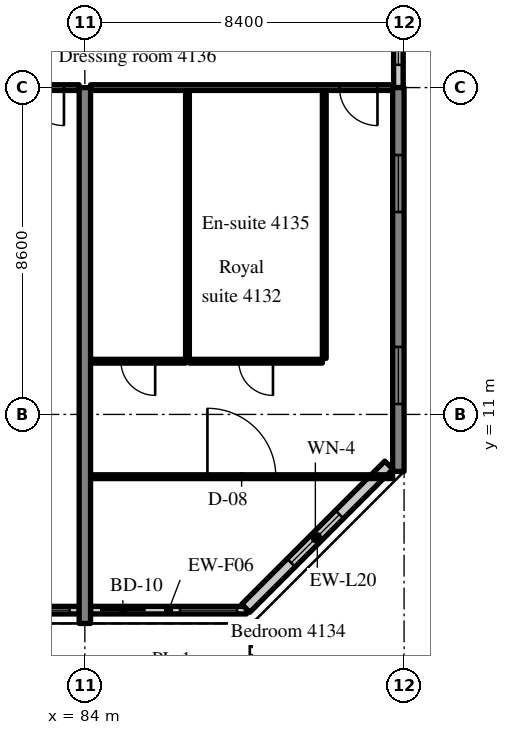
"""IFC4 building model, lengths in metres.
Left out: names, types, materials, properties, quantities, classifications, styles, units other than length and angle.
Written with IfcOpenShell. Run it as: python <this file> out.ifc"""

import sys

from ifc_helpers import new_model, si_unit, direction, frame, frame_2d, origin, place, context, subcontext, project, spatial, rectangle, extrude, source, transform, mapped, element, fill, save


model = new_model("IFC4")
c1 = context("Model", 3, precision=1e-05, world=origin(), true_north=direction((0.0, 1.0)))
c2 = subcontext(c1, "Body", "Model", "MODEL_VIEW")
j1 = project(units=[si_unit("LENGTHUNIT", "METRE"), si_unit("PLANEANGLEUNIT", "RADIAN")], contexts=[c1])
p1 = place(None, origin())
s1 = spatial("IfcSite", under=j1, at=p1, CompositionType="ELEMENT")
p2 = place(p1, origin())
s2 = spatial("IfcBuilding", under=s1, at=p2, CompositionType="ELEMENT")
p3 = place(p2, frame((0.0, 0.0, 170.6)))
s3 = spatial("IfcBuildingStorey", under=s2, at=p3, CompositionType="ELEMENT", Elevation=170.6)
m1 = source(origin(), c2, "Body", "SweptSolid", [
    extrude(rectangle(XDim=14.1, YDim=0.3, at=frame_2d((7.05, 0.0))), origin(), (0.0, 0.0, 1.0), 3.52),
])
p4 = place(p3, frame((84.0, 5.5, 0.0), z_axis=(0.0, 0.0, 1.0), x_axis=(0.0, 1.0, 0.0)))
e1 = element("IfcWall", 1, at=p4, inside=s3, PredefinedType="SHEAR", context=c2, shape_type="MappedRepresentation", body=[
    mapped(m1, transform((0.0, 0.0, 0.0), scale=1.0)),
])
m2 = source(origin(), c2, "Body", "SweptSolid", [
    extrude(rectangle(XDim=10.1, YDim=0.3, at=frame_2d((5.05, 0.0))), origin(), (0.0, 0.0, 1.0), 3.52),
])
p5 = place(p3, frame((92.25, 9.5, 0.0), z_axis=(0.0, 0.0, 1.0), x_axis=(0.0, 1.0, 0.0)))
e2 = element("IfcWall", 2, at=p5, inside=s3, PredefinedType="SHEAR", context=c2, shape_type="MappedRepresentation", body=[
    mapped(m2, transform((0.0, 0.0, 0.0), scale=1.0)),
])
m3 = source(origin(), c2, "Body", "SweptSolid", [
    extrude(rectangle(XDim=1.5, YDim=1.5, at=frame_2d((0.75, 0.75))), frame((0.0, 0.16, 0.0), z_axis=(0.0, -1.0, 0.0), x_axis=(1.0, 0.0, 0.0)), (0.0, 0.0, 1.0), 0.32),
])
p6 = place(p5, frame((1.775, 0.0, 0.9)))
e3 = element("IfcOpeningElement", 3, at=p6, cuts=e2, PredefinedType="OPENING", context=c2, shape_type="MappedRepresentation", body=[
    mapped(m3, transform((0.0, 0.0, 0.0), scale=1.0)),
])
p7 = place(p5, frame((6.825, 0.0, 0.9)))
e4 = element("IfcOpeningElement", 4, at=p7, cuts=e2, PredefinedType="OPENING", context=c2, shape_type="MappedRepresentation", body=[
    mapped(m3, transform((0.0, 0.0, 0.0), scale=1.0)),
])
m4 = source(origin(), c2, "Body", "SweptSolid", [
    extrude(rectangle(XDim=8.1, YDim=0.2, at=frame_2d((4.05, 0.0))), origin(), (0.0, 0.0, 1.0), 2.87),
])
p8 = place(p3, frame((75.75, 5.85, 0.0), z_axis=(0.0, 0.0, 1.0), x_axis=(1.0, 0.0, 0.0)))
e5 = element("IfcWall", 5, at=p8, inside=s3, PredefinedType="SOLIDWALL", context=c2, shape_type="MappedRepresentation", body=[
    mapped(m4, transform((0.0, 0.0, 0.0), scale=1.0)),
])
m5 = source(origin(), c2, "Body", "SweptSolid", [
    extrude(rectangle(XDim=1.2, YDim=2.4, at=frame_2d((0.6, 1.2))), frame((0.0, 0.11, 0.0), z_axis=(0.0, -1.0, 0.0), x_axis=(1.0, 0.0, 0.0)), (0.0, 0.0, 1.0), 0.22),
])
p9 = place(p8, frame((0.25, 0.0, 0.0)))
e6 = element("IfcOpeningElement", 6, at=p9, cuts=e5, PredefinedType="OPENING", context=c2, shape_type="MappedRepresentation", body=[
    mapped(m5, transform((0.0, 0.0, 0.0), scale=1.0)),
])
m6 = source(origin(), c2, "Body", "SweptSolid", [
    extrude(rectangle(XDim=1.5, YDim=1.5, at=frame_2d((0.75, 0.75))), frame((0.0, 0.11, 0.0), z_axis=(0.0, -1.0, 0.0), x_axis=(1.0, 0.0, 0.0)), (0.0, 0.0, 1.0), 0.22),
])
p10 = place(p8, frame((2.3, 0.0, 0.9)))
e7 = element("IfcOpeningElement", 7, at=p10, cuts=e5, PredefinedType="OPENING", context=c2, shape_type="MappedRepresentation", body=[
    mapped(m6, transform((0.0, 0.0, 0.0), scale=1.0)),
])
p11 = place(p8, frame((4.3, 0.0, 0.0)))
e8 = element("IfcOpeningElement", 8, at=p11, cuts=e5, PredefinedType="OPENING", context=c2, shape_type="MappedRepresentation", body=[
    mapped(m5, transform((0.0, 0.0, 0.0), scale=1.0)),
])
p12 = place(p8, frame((6.35, 0.0, 0.9)))
e9 = element("IfcOpeningElement", 9, at=p12, cuts=e5, PredefinedType="OPENING", context=c2, shape_type="MappedRepresentation", body=[
    mapped(m6, transform((0.0, 0.0, 0.0), scale=1.0)),
])
m7 = source(origin(), c2, "Body", "SweptSolid", [
    extrude(rectangle(XDim=4.105, YDim=0.2, at=frame_2d((2.052, 0.0))), origin(), (0.0, 0.0, 1.0), 2.87),
])
p13 = place(p3, frame((84.15, 5.85, 0.0), z_axis=(0.0, 0.0, 1.0), x_axis=(1.0, 0.0, 0.0)))
e10 = element("IfcWall", 10, at=p13, inside=s3, PredefinedType="SOLIDWALL", context=c2, shape_type="MappedRepresentation", body=[
    mapped(m7, transform((0.0, 0.0, 0.0), scale=1.0)),
])
p14 = place(p13, frame((0.25, 0.0, 0.0)))
e11 = element("IfcOpeningElement", 11, at=p14, cuts=e10, PredefinedType="OPENING", context=c2, shape_type="MappedRepresentation", body=[
    mapped(m5, transform((0.0, 0.0, 0.0), scale=1.0)),
])
p15 = place(p13, frame((2.355, 0.0, 0.9)))
e12 = element("IfcOpeningElement", 12, at=p15, cuts=e10, PredefinedType="OPENING", context=c2, shape_type="MappedRepresentation", body=[
    mapped(m6, transform((0.0, 0.0, 0.0), scale=1.0)),
])
m8 = source(origin(), c2, "Body", "SweptSolid", [
    extrude(rectangle(XDim=5.326, YDim=0.3, at=frame_2d((2.663, 0.0))), origin(), (0.0, 0.0, 1.0), 3.52),
])
p16 = place(p3, frame((88.234, 5.9, 0.0), z_axis=(0.0, 0.0, 1.0), x_axis=(0.707083859269, 0.707129702361, 0.0)))
e13 = element("IfcWall", 13, at=p16, inside=s3, PredefinedType="SOLIDWALL", context=c2, shape_type="MappedRepresentation", body=[
    mapped(m8, transform((0.0, 0.0, 0.0), scale=1.0)),
])
m9 = source(origin(), c2, "Body", "SweptSolid", [
    extrude(rectangle(XDim=1.8, YDim=1.5, at=frame_2d((0.9, 0.75))), frame((0.0, 0.16, 0.0), z_axis=(0.0, -1.0, 0.0), x_axis=(1.0, 0.0, 0.0)), (0.0, 0.0, 1.0), 0.32),
])
p17 = place(p16, frame((1.689, 0.0, 0.9)))
e14 = element("IfcOpeningElement", 14, at=p17, cuts=e13, PredefinedType="OPENING", context=c2, shape_type="MappedRepresentation", body=[
    mapped(m9, transform((0.0, 0.0, 0.0), scale=1.0)),
])
m10 = source(origin(), c2, "Body", "SweptSolid", [
    extrude(rectangle(XDim=2.4, YDim=0.25, at=frame_2d((1.2, 0.0))), origin(), (0.0, 0.0, 1.0), 2.62),
])
p18 = place(p3, frame((92.25, 19.6, 0.0), z_axis=(0.0, 0.0, 1.0), x_axis=(0.0, 1.0, 0.0)))
e15 = element("IfcWall", 15, at=p18, inside=s3, PredefinedType="SOLIDWALL", context=c2, shape_type="MappedRepresentation", body=[
    mapped(m10, transform((0.0, 0.0, 0.0), scale=1.0)),
])
m11 = source(origin(), c2, "Body", "SweptSolid", [
    extrude(rectangle(XDim=1.2, YDim=1.5, at=frame_2d((0.6, 0.75))), frame((0.0, 0.135, 0.0), z_axis=(0.0, -1.0, 0.0), x_axis=(1.0, 0.0, 0.0)), (0.0, 0.0, 1.0), 0.27),
])
p19 = place(p18, frame((0.6, 0.0, 0.9)))
e16 = element("IfcOpeningElement", 16, at=p19, cuts=e15, PredefinedType="OPENING", context=c2, shape_type="MappedRepresentation", body=[
    mapped(m11, transform((0.0, 0.0, 0.0), scale=1.0)),
])
m12 = source(origin(), c2, "Body", "SweptSolid", [
    extrude(rectangle(XDim=3.975, YDim=0.15, at=frame_2d((1.988, 0.0))), origin(), (0.0, 0.0, 1.0), 2.82),
])
p20 = place(p3, frame((79.875, 19.6, 0.0), z_axis=(0.0, 0.0, 1.0), x_axis=(1.0, 0.0, 0.0)))
e17 = element("IfcWall", 17, at=p20, inside=s3, PredefinedType="PARTITIONING", context=c2, shape_type="MappedRepresentation", body=[
    mapped(m12, transform((0.0, 0.0, 0.0), scale=1.0)),
])
m13 = source(origin(), c2, "Body", "SweptSolid", [
    extrude(rectangle(XDim=1.0, YDim=2.1, at=frame_2d((0.5, 1.05))), frame((0.0, 0.085, 0.0), z_axis=(0.0, -1.0, 0.0), x_axis=(1.0, 0.0, 0.0)), (0.0, 0.0, 1.0), 0.17),
])
p21 = place(p20, frame((2.575, 0.0, 0.0)))
e18 = element("IfcOpeningElement", 18, at=p21, cuts=e17, PredefinedType="OPENING", context=c2, shape_type="MappedRepresentation", body=[
    mapped(m13, transform((0.0, 0.0, 0.0), scale=1.0)),
])
m14 = source(origin(), c2, "Body", "SweptSolid", [
    extrude(rectangle(XDim=7.05, YDim=0.1, at=frame_2d((3.525, 0.0))), origin(), (0.0, 0.0, 1.0), 3.52),
])
for number, where, z_axis, x_axis in (
    (19, (90.3, 12.475, 0.0), (0.0, 0.0, 1.0), (0.0, 1.0, 0.0)),
    (20, (86.7, 12.475, 0.0), (0.0, 0.0, 1.0), (0.0, 1.0, 0.0)),
):
    element("IfcWall", number, at=place(p3, frame(where, z_axis=z_axis, x_axis=x_axis)), inside=s3, PredefinedType="PARTITIONING", context=c2, shape_type="MappedRepresentation", body=[
        mapped(m14, transform((0.0, 0.0, 0.0), scale=1.0)),
    ])
m15 = source(origin(), c2, "Body", "SweptSolid", [
    extrude(rectangle(XDim=3.5, YDim=0.1, at=frame_2d((1.75, 0.0))), origin(), (0.0, 0.0, 1.0), 3.52),
])
p22 = place(p3, frame((86.75, 12.4, 0.0), z_axis=(0.0, 0.0, 1.0), x_axis=(1.0, 0.0, 0.0)))
e21 = element("IfcWall", 21, at=p22, inside=s3, PredefinedType="PARTITIONING", context=c2, shape_type="MappedRepresentation", body=[
    mapped(m15, transform((0.0, 0.0, 0.0), scale=1.0)),
])
m16 = source(origin(), c2, "Body", "SweptSolid", [
    extrude(rectangle(XDim=0.9, YDim=2.1, at=frame_2d((0.45, 1.05))), frame((0.0, 0.06, 0.0), z_axis=(0.0, -1.0, 0.0), x_axis=(1.0, 0.0, 0.0)), (0.0, 0.0, 1.0), 0.12),
])
p23 = place(p22, frame((1.3, 0.0, 0.0)))
e22 = element("IfcOpeningElement", 22, at=p23, cuts=e21, PredefinedType="OPENING", context=c2, shape_type="MappedRepresentation", body=[
    mapped(m16, transform((0.0, 0.0, 0.0), scale=1.0)),
])
m17 = source(origin(), c2, "Body", "SweptSolid", [
    extrude(rectangle(XDim=2.5, YDim=0.1, at=frame_2d((1.25, 0.0))), origin(), (0.0, 0.0, 1.0), 3.52),
])
p24 = place(p3, frame((84.15, 12.4, 0.0), z_axis=(0.0, 0.0, 1.0), x_axis=(1.0, 0.0, 0.0)))
e23 = element("IfcWall", 23, at=p24, inside=s3, PredefinedType="PARTITIONING", context=c2, shape_type="MappedRepresentation", body=[
    mapped(m17, transform((0.0, 0.0, 0.0), scale=1.0)),
])
p25 = place(p24, frame((0.8, 0.0, 0.0)))
e24 = element("IfcOpeningElement", 24, at=p25, cuts=e23, PredefinedType="OPENING", context=c2, shape_type="MappedRepresentation", body=[
    mapped(m16, transform((0.0, 0.0, 0.0), scale=1.0)),
])
m18 = source(origin(), c2, "Body", "SweptSolid", [
    extrude(rectangle(XDim=7.95, YDim=0.1, at=frame_2d((3.975, 0.0))), origin(), (0.0, 0.0, 1.0), 3.52),
])
p26 = place(p3, frame((84.15, 9.362, 0.0), z_axis=(0.0, 0.0, 1.0), x_axis=(1.0, 0.0, 0.0)))
e25 = element("IfcWall", 25, at=p26, inside=s3, PredefinedType="PARTITIONING", context=c2, shape_type="MappedRepresentation", body=[
    mapped(m18, transform((0.0, 0.0, 0.0), scale=1.0)),
])
m19 = source(origin(), c2, "Body", "SweptSolid", [
    extrude(rectangle(XDim=1.8, YDim=2.1, at=frame_2d((0.9, 1.05))), frame((0.0, 0.06, 0.0), z_axis=(0.0, -1.0, 0.0), x_axis=(1.0, 0.0, 0.0)), (0.0, 0.0, 1.0), 0.12),
])
p27 = place(p26, frame((3.075, 0.0, 0.0)))
e26 = element("IfcOpeningElement", 26, at=p27, cuts=e25, PredefinedType="OPENING", context=c2, shape_type="MappedRepresentation", body=[
    mapped(m19, transform((0.0, 0.0, 0.0), scale=1.0)),
])
m20 = source(origin(), c2, "Body", "SweptSolid", [
    extrude(rectangle(XDim=7.95, YDim=0.15, at=frame_2d((3.975, 0.0))), origin(), (0.0, 0.0, 1.0), 2.82),
])
p28 = place(p3, frame((84.15, 19.6, 0.0), z_axis=(0.0, 0.0, 1.0), x_axis=(1.0, 0.0, 0.0)))
e27 = element("IfcWall", 27, at=p28, inside=s3, PredefinedType="PARTITIONING", context=c2, shape_type="MappedRepresentation", body=[
    mapped(m20, transform((0.0, 0.0, 0.0), scale=1.0)),
])
p29 = place(p28, frame((6.55, 0.0, 0.0)))
e28 = element("IfcOpeningElement", 28, at=p29, cuts=e27, PredefinedType="OPENING", context=c2, shape_type="MappedRepresentation", body=[
    mapped(m13, transform((0.0, 0.0, 0.0), scale=1.0)),
])
m21 = source(origin(), c2, "Body", "SweptSolid", [
    extrude(rectangle(XDim=1.5, YDim=1.5, at=frame_2d((0.75, 0.75))), frame((0.0, 0.03, 0.0), z_axis=(0.0, -1.0, 0.0), x_axis=(1.0, 0.0, 0.0)), (0.0, 0.0, 1.0), 0.06),
])
p30 = place(p12, origin())
e29 = element("IfcWindow", 29, at=p30, inside=s3, PartitioningType="SINGLE_PANEL", PredefinedType="WINDOW", context=c2, shape_type="MappedRepresentation", body=[
    mapped(m21, transform((0.0, 0.0, 0.0), scale=1.0)),
])
fill(e9, e29)
m22 = source(origin(), c2, "Body", "SweptSolid", [
    extrude(rectangle(XDim=1.2, YDim=2.4, at=frame_2d((0.6, 1.2))), frame((0.0, 0.025, 0.0), z_axis=(0.0, -1.0, 0.0), x_axis=(1.0, 0.0, 0.0)), (0.0, 0.0, 1.0), 0.05),
])
p31 = place(p14, origin())
e30 = element("IfcDoor", 30, at=p31, inside=s3, OperationType="SLIDING_TO_RIGHT", PredefinedType="DOOR", context=c2, shape_type="MappedRepresentation", body=[
    mapped(m22, transform((0.0, 0.0, 0.0), scale=1.0)),
])
fill(e11, e30)
p32 = place(p15, origin())
e31 = element("IfcWindow", 31, at=p32, inside=s3, PartitioningType="SINGLE_PANEL", PredefinedType="WINDOW", context=c2, shape_type="MappedRepresentation", body=[
    mapped(m21, transform((0.0, 0.0, 0.0), scale=1.0)),
])
fill(e12, e31)
m23 = source(origin(), c2, "Body", "SweptSolid", [
    extrude(rectangle(XDim=1.8, YDim=1.5, at=frame_2d((0.9, 0.75))), frame((0.0, 0.03, 0.0), z_axis=(0.0, -1.0, 0.0), x_axis=(1.0, 0.0, 0.0)), (0.0, 0.0, 1.0), 0.06),
])
p33 = place(p17, origin())
e32 = element("IfcWindow", 32, at=p33, inside=s3, PartitioningType="SINGLE_PANEL", PredefinedType="WINDOW", context=c2, shape_type="MappedRepresentation", body=[
    mapped(m23, transform((0.0, 0.0, 0.0), scale=1.0)),
])
fill(e14, e32)
p34 = place(p6, origin())
e33 = element("IfcWindow", 33, at=p34, inside=s3, PartitioningType="SINGLE_PANEL", PredefinedType="WINDOW", context=c2, shape_type="MappedRepresentation", body=[
    mapped(m21, transform((0.0, 0.0, 0.0), scale=1.0)),
])
fill(e3, e33)
p35 = place(p7, origin())
e34 = element("IfcWindow", 34, at=p35, inside=s3, PartitioningType="SINGLE_PANEL", PredefinedType="WINDOW", context=c2, shape_type="MappedRepresentation", body=[
    mapped(m21, transform((0.0, 0.0, 0.0), scale=1.0)),
])
fill(e4, e34)
m24 = source(origin(), c2, "Body", "SweptSolid", [
    extrude(rectangle(XDim=1.2, YDim=1.5, at=frame_2d((0.6, 0.75))), frame((0.0, 0.03, 0.0), z_axis=(0.0, -1.0, 0.0), x_axis=(1.0, 0.0, 0.0)), (0.0, 0.0, 1.0), 0.06),
])
p36 = place(p19, origin())
e35 = element("IfcWindow", 35, at=p36, inside=s3, PartitioningType="SINGLE_PANEL", PredefinedType="WINDOW", context=c2, shape_type="MappedRepresentation", body=[
    mapped(m24, transform((0.0, 0.0, 0.0), scale=1.0)),
])
fill(e16, e35)
m25 = source(origin(), c2, "Body", "SweptSolid", [
    extrude(rectangle(XDim=1.0, YDim=2.1, at=frame_2d((0.5, 1.05))), frame((0.0, 0.025, 0.0), z_axis=(0.0, -1.0, 0.0), x_axis=(1.0, 0.0, 0.0)), (0.0, 0.0, 1.0), 0.05),
])
p37 = place(p21, origin())
e36 = element("IfcDoor", 36, at=p37, inside=s3, OperationType="SINGLE_SWING_RIGHT", PredefinedType="DOOR", context=c2, shape_type="MappedRepresentation", body=[
    mapped(m25, transform((0.0, 0.0, 0.0), scale=1.0)),
])
fill(e18, e36)
m26 = source(origin(), c2, "Body", "SweptSolid", [
    extrude(rectangle(XDim=0.9, YDim=2.1, at=frame_2d((0.45, 1.05))), frame((0.0, 0.025, 0.0), z_axis=(0.0, -1.0, 0.0), x_axis=(1.0, 0.0, 0.0)), (0.0, 0.0, 1.0), 0.05),
])
p38 = place(p23, origin())
e37 = element("IfcDoor", 37, at=p38, inside=s3, OperationType="SINGLE_SWING_RIGHT", PredefinedType="DOOR", context=c2, shape_type="MappedRepresentation", body=[
    mapped(m26, transform((0.0, 0.0, 0.0), scale=1.0)),
])
fill(e22, e37)
p39 = place(p25, origin())
e38 = element("IfcDoor", 38, at=p39, inside=s3, OperationType="SINGLE_SWING_RIGHT", PredefinedType="DOOR", context=c2, shape_type="MappedRepresentation", body=[
    mapped(m26, transform((0.0, 0.0, 0.0), scale=1.0)),
])
fill(e24, e38)
m27 = source(origin(), c2, "Body", "SweptSolid", [
    extrude(rectangle(XDim=1.8, YDim=2.1, at=frame_2d((0.9, 1.05))), frame((0.0, 0.025, 0.0), z_axis=(0.0, -1.0, 0.0), x_axis=(1.0, 0.0, 0.0)), (0.0, 0.0, 1.0), 0.05),
])
p40 = place(p27, origin())
e39 = element("IfcDoor", 39, at=p40, inside=s3, OperationType="DOUBLE_DOOR_SINGLE_SWING", PredefinedType="DOOR", context=c2, shape_type="MappedRepresentation", body=[
    mapped(m27, transform((0.0, 0.0, 0.0), scale=1.0)),
])
fill(e26, e39)
p41 = place(p29, origin())
e40 = element("IfcDoor", 40, at=p41, inside=s3, OperationType="SINGLE_SWING_RIGHT", PredefinedType="DOOR", context=c2, shape_type="MappedRepresentation", body=[
    mapped(m25, transform((0.0, 0.0, 0.0), scale=1.0)),
])
fill(e28, e40)
save(model, sys.argv[1])
